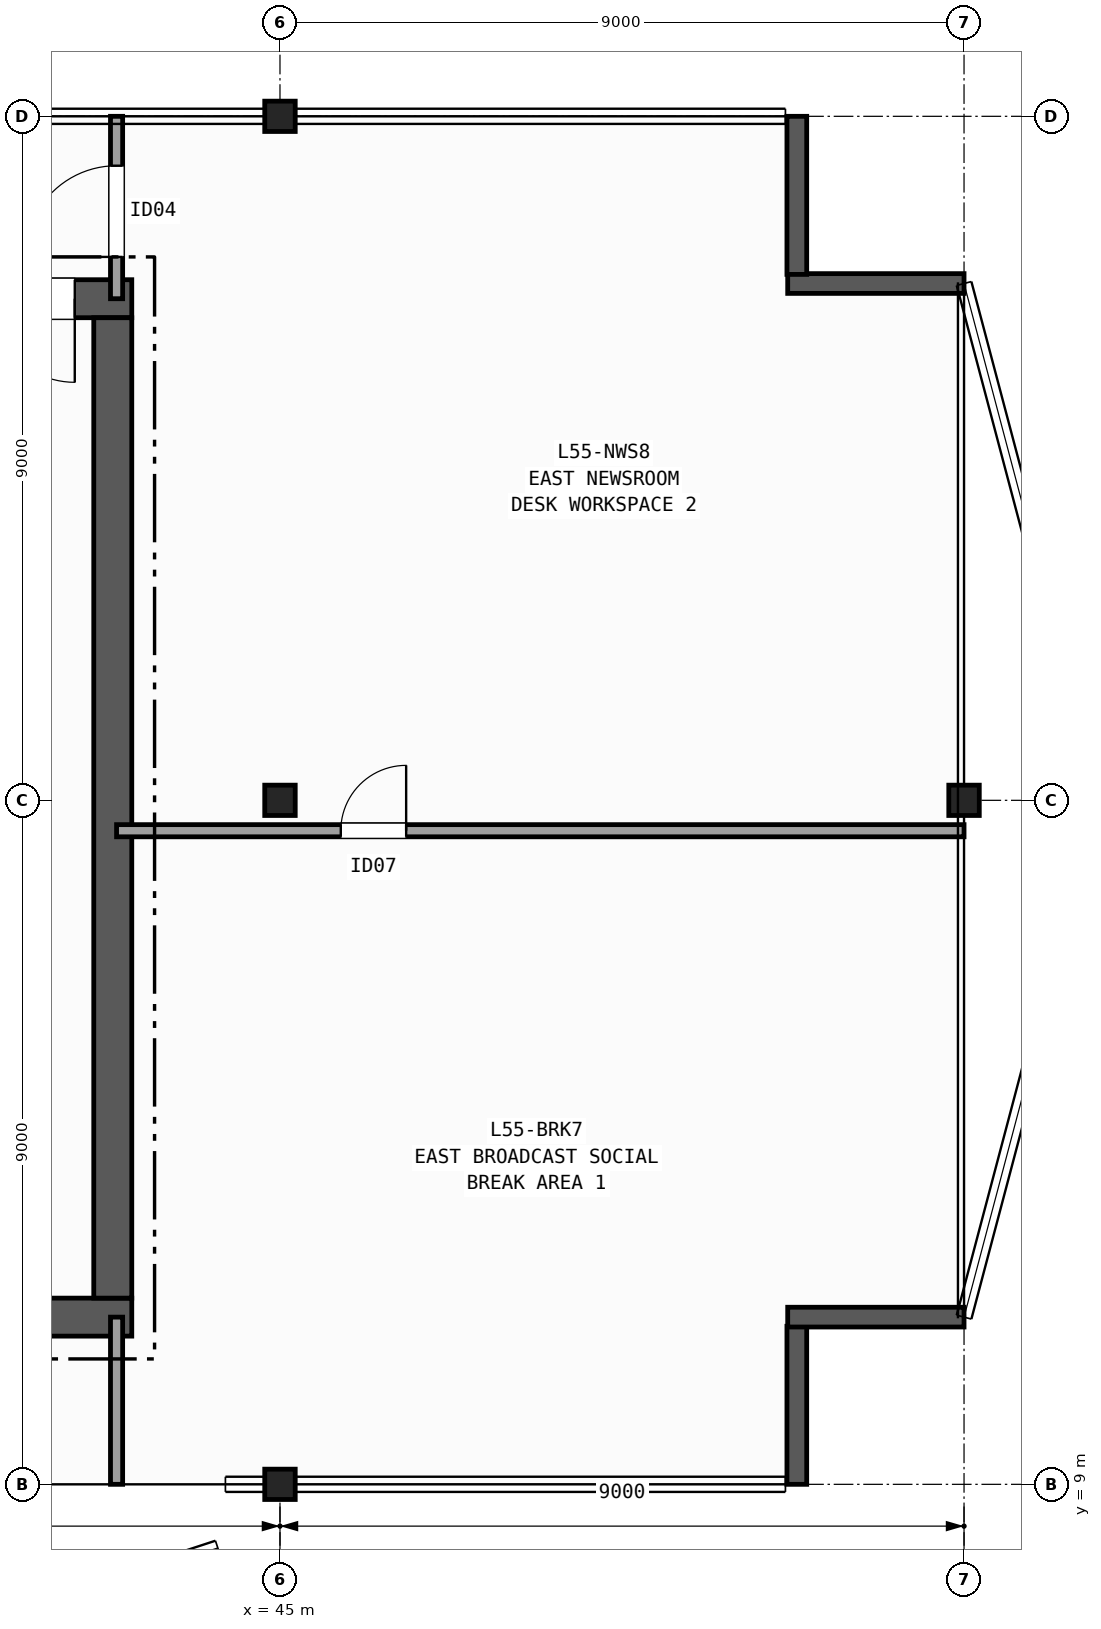
"""IFC4 building model, lengths in metres.
Left out: names, types, materials, properties, quantities, classifications, styles, units other than length and angle.
Written with IfcOpenShell. Run it as: python <this file> out.ifc"""

import sys

from ifc_helpers import new_model, si_unit, direction, frame, frame_2d, origin, origin_2d, place, context, subcontext, project, spatial, rectangle, i_section, extrude, element, fill, save


model = new_model("IFC4")
c1 = context("Model", 3, precision=1e-05, world=origin(), true_north=direction((0.0, 1.0)))
c2 = subcontext(c1, "Body", "Model", "MODEL_VIEW")
j1 = project(units=[si_unit("LENGTHUNIT", "METRE"), si_unit("PLANEANGLEUNIT", "RADIAN")], contexts=[c1])
p1 = place(None, origin())
s1 = spatial("IfcSite", under=j1, at=p1, CompositionType="ELEMENT")
p2 = place(p1, origin())
s2 = spatial("IfcBuilding", under=s1, at=p2, CompositionType="ELEMENT")
p3 = place(p2, frame((0.0, 0.0, 221.0)))
s3 = spatial("IfcBuildingStorey", under=s2, at=p3, CompositionType="ELEMENT", Elevation=221.0)
for number, where, z_axis, x_axis in (
    (1, (45.0, 9.0, 0.0), (0.0, 0.0, 1.0), (1.0, 0.0, 0.0)),
    (2, (45.0, 18.0, 0.0), (0.0, 0.0, 1.0), (1.0, 0.0, 0.0)),
    (3, (45.0, 27.0, 0.0), (0.0, 0.0, 1.0), (1.0, 0.0, 0.0)),
    (4, (54.0, 18.0, 0.0), (0.0, 0.0, 1.0), (1.0, 0.0, 0.0)),
):
    element("IfcColumn", number, at=place(p3, frame(where, z_axis=z_axis, x_axis=x_axis)), inside=s3, PredefinedType="COLUMN", context=c2, shape_type="SweptSolid", body=[
        extrude(i_section(OverallWidth=0.401, OverallDepth=0.399, WebThickness=0.025, FlangeThickness=0.04, FilletRadius=0.015, at=origin_2d()), origin(), (0.0, 0.0, 1.0), 3.7),
    ])
p4 = place(p3, frame((51.8, 9.0, 0.0), z_axis=(0.0, 0.0, 1.0), x_axis=(0.0, 1.0, 0.0)))
e5 = element("IfcWall", 5, at=p4, inside=s3, PredefinedType="SOLIDWALL", context=c2, shape_type="SweptSolid", body=[
    extrude(rectangle(XDim=2.08, YDim=0.26, at=frame_2d((1.04, 0.0))), origin(), (0.0, 0.0, 1.0), 3.42),
])
for number, where, z_axis, x_axis in (
    (6, (51.68, 11.2, 0.0), (0.0, 0.0, 1.0), (1.0, 0.0, 0.0)),
    (7, (54.0, 24.8, 0.0), (0.0, 0.0, 1.0), (-1.0, 0.0, 0.0)),
):
    element("IfcWall", number, at=place(p3, frame(where, z_axis=z_axis, x_axis=x_axis)), inside=s3, PredefinedType="SOLIDWALL", context=c2, shape_type="SweptSolid", body=[
        extrude(rectangle(XDim=2.32, YDim=0.26, at=frame_2d((1.16, 0.0))), origin(), (0.0, 0.0, 1.0), 3.42),
    ])
p5 = place(p3, frame((51.8, 24.92, 0.0), z_axis=(0.0, 0.0, 1.0), x_axis=(0.0, 1.0, 0.0)))
e8 = element("IfcWall", 8, at=p5, inside=s3, PredefinedType="SOLIDWALL", context=c2, shape_type="SweptSolid", body=[
    extrude(rectangle(XDim=2.08, YDim=0.26, at=frame_2d((1.04, 0.0))), origin(), (0.0, 0.0, 1.0), 3.42),
])
p6 = place(p3, frame((29.15, 11.2, 0.0), z_axis=(0.0, 0.0, 1.0), x_axis=(1.0, 0.0, 0.0)))
e9 = element("IfcWall", 9, at=p6, inside=s3, PredefinedType="SHEAR", context=c2, shape_type="SweptSolid", body=[
    extrude(rectangle(XDim=13.9, YDim=0.5, at=frame_2d((6.95, 0.0))), origin(), (0.0, 0.0, 1.0), 3.42),
])
p7 = place(p3, frame((43.05, 24.6, 0.0), z_axis=(0.0, 0.0, 1.0), x_axis=(-1.0, 0.0, 0.0)))
e10 = element("IfcWall", 10, at=p7, inside=s3, PredefinedType="SHEAR", context=c2, shape_type="SweptSolid", body=[
    extrude(rectangle(XDim=13.9, YDim=0.5, at=frame_2d((6.95, 0.0))), origin(), (0.0, 0.0, 1.0), 3.42),
])
p8 = place(p7, frame((0.75, 0.0, 0.0)))
e11 = element("IfcOpeningElement", 11, at=p8, cuts=e10, PredefinedType="OPENING", context=c2, shape_type="SweptSolid", body=[
    extrude(rectangle(XDim=1.1, YDim=2.15, at=frame_2d((0.55, 1.075))), frame((0.0, 0.26, 0.0), z_axis=(0.0, -1.0, 0.0), x_axis=(1.0, 0.0, 0.0)), (0.0, 0.0, 1.0), 0.52),
])
p9 = place(p7, frame((2.7, 0.0, 0.0)))
e12 = element("IfcOpeningElement", 12, at=p9, cuts=e10, PredefinedType="OPENING", context=c2, shape_type="SweptSolid", body=[
    extrude(rectangle(XDim=0.9, YDim=2.1, at=frame_2d((0.45, 1.05))), frame((0.0, 0.26, 0.0), z_axis=(0.0, -1.0, 0.0), x_axis=(1.0, 0.0, 0.0)), (0.0, 0.0, 1.0), 0.52),
])
p10 = place(p7, frame((4.6, 0.0, 0.0)))
e13 = element("IfcOpeningElement", 13, at=p10, cuts=e10, PredefinedType="OPENING", context=c2, shape_type="SweptSolid", body=[
    extrude(rectangle(XDim=0.9, YDim=2.1, at=frame_2d((0.45, 1.05))), frame((0.0, 0.26, 0.0), z_axis=(0.0, -1.0, 0.0), x_axis=(1.0, 0.0, 0.0)), (0.0, 0.0, 1.0), 0.52),
])
p11 = place(p3, frame((42.8, 11.45, 0.0), z_axis=(0.0, 0.0, 1.0), x_axis=(0.0, 1.0, 0.0)))
e14 = element("IfcWall", 14, at=p11, inside=s3, PredefinedType="SHEAR", context=c2, shape_type="SweptSolid", body=[
    extrude(rectangle(XDim=12.9, YDim=0.5, at=frame_2d((6.45, 0.0))), origin(), (0.0, 0.0, 1.0), 3.42),
])
p12 = place(p3, frame((42.85, 9.0, 0.0), z_axis=(0.0, 0.0, 1.0), x_axis=(0.0, 1.0, 0.0)))
e15 = element("IfcWall", 15, at=p12, inside=s3, PredefinedType="PARTITIONING", context=c2, shape_type="SweptSolid", body=[
    extrude(rectangle(XDim=2.2, YDim=0.16, at=frame_2d((1.1, 0.0))), origin(), (0.0, 0.0, 1.0), 2.707),
])
p13 = place(p3, frame((42.85, 24.6, 0.0), z_axis=(0.0, 0.0, 1.0), x_axis=(0.0, 1.0, 0.0)))
e16 = element("IfcWall", 16, at=p13, inside=s3, PredefinedType="PARTITIONING", context=c2, shape_type="SweptSolid", body=[
    extrude(rectangle(XDim=2.4, YDim=0.16, at=frame_2d((1.2, 0.0))), origin(), (0.0, 0.0, 1.0), 2.707),
])
p14 = place(p13, frame((0.55, 0.0, 0.0)))
e17 = element("IfcOpeningElement", 17, at=p14, cuts=e16, PredefinedType="OPENING", context=c2, shape_type="SweptSolid", body=[
    extrude(rectangle(XDim=1.2, YDim=2.15, at=frame_2d((0.6, 1.075))), frame((0.0, 0.09, 0.0), z_axis=(0.0, -1.0, 0.0), x_axis=(1.0, 0.0, 0.0)), (0.0, 0.0, 1.0), 0.18),
])
p15 = place(p3, frame((42.85, 17.6, 0.0), z_axis=(0.0, 0.0, 1.0), x_axis=(1.0, 0.0, 0.0)))
e18 = element("IfcWall", 18, at=p15, inside=s3, PredefinedType="PARTITIONING", context=c2, shape_type="SweptSolid", body=[
    extrude(rectangle(XDim=11.15, YDim=0.16, at=frame_2d((5.575, 0.0))), origin(), (0.0, 0.0, 1.0), 3.42),
])
p16 = place(p15, frame((2.95, 0.0, 0.0)))
e19 = element("IfcOpeningElement", 19, at=p16, cuts=e18, PredefinedType="OPENING", context=c2, shape_type="SweptSolid", body=[
    extrude(rectangle(XDim=0.86, YDim=2.05, at=frame_2d((0.43, 1.025))), frame((0.0, 0.09, 0.0), z_axis=(0.0, -1.0, 0.0), x_axis=(1.0, 0.0, 0.0)), (0.0, 0.0, 1.0), 0.18),
])
p17 = place(p8, origin())
e20 = element("IfcDoor", 20, at=p17, inside=s3, OperationType="SINGLE_SWING_LEFT", PredefinedType="DOOR", context=c2, shape_type="SweptSolid", body=[
    extrude(rectangle(XDim=1.1, YDim=2.15, at=frame_2d((0.55, 1.075))), frame((0.0, 0.025, 0.0), z_axis=(0.0, -1.0, 0.0), x_axis=(1.0, 0.0, 0.0)), (0.0, 0.0, 1.0), 0.05),
])
fill(e11, e20)
p18 = place(p14, origin())
e21 = element("IfcDoor", 21, at=p18, inside=s3, OperationType="SINGLE_SWING_LEFT", PredefinedType="DOOR", context=c2, shape_type="SweptSolid", body=[
    extrude(rectangle(XDim=1.2, YDim=2.15, at=frame_2d((0.6, 1.075))), frame((0.0, 0.025, 0.0), z_axis=(0.0, -1.0, 0.0), x_axis=(1.0, 0.0, 0.0)), (0.0, 0.0, 1.0), 0.05),
])
fill(e17, e21)
p19 = place(p16, origin())
e22 = element("IfcDoor", 22, at=p19, inside=s3, OperationType="SINGLE_SWING_RIGHT", PredefinedType="DOOR", context=c2, shape_type="SweptSolid", body=[
    extrude(rectangle(XDim=0.86, YDim=2.05, at=frame_2d((0.43, 1.025))), frame((0.0, 0.025, 0.0), z_axis=(0.0, -1.0, 0.0), x_axis=(1.0, 0.0, 0.0)), (0.0, 0.0, 1.0), 0.05),
])
fill(e19, e22)
save(model, sys.argv[1])
